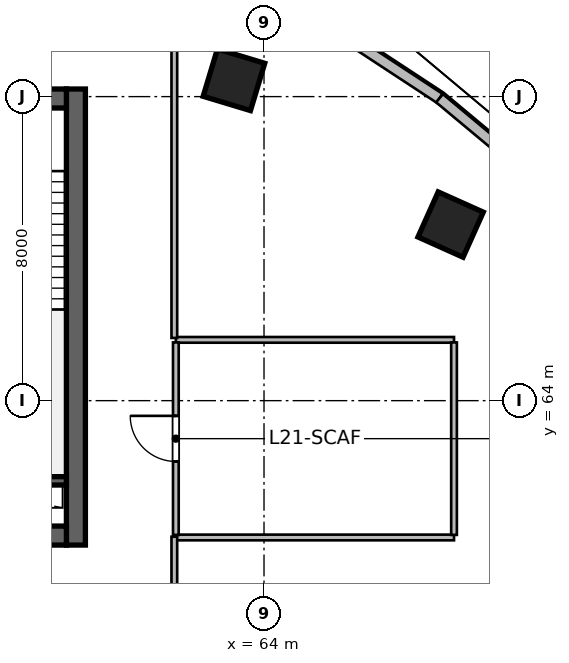
"""IFC4 building model, lengths in metres.
Left out: names, types, materials, properties, quantities, classifications, styles, units other than length and angle.
Written with IfcOpenShell. Run it as: python <this file> out.ifc"""

import sys

from ifc_helpers import new_model, si_unit, direction, frame, frame_2d, origin, origin_2d, place, context, subcontext, project, spatial, rectangle, extrude, source, transform, mapped, element, fill, save


model = new_model("IFC4")
c1 = context("Model", 3, precision=1e-05, world=origin(), true_north=direction((0.0, 1.0)))
c2 = subcontext(c1, "Body", "Model", "MODEL_VIEW")
j1 = project(units=[si_unit("LENGTHUNIT", "METRE"), si_unit("PLANEANGLEUNIT", "RADIAN")], contexts=[c1])
p1 = place(None, origin())
s1 = spatial("IfcSite", under=j1, at=p1, CompositionType="ELEMENT")
p2 = place(p1, origin())
s2 = spatial("IfcBuilding", under=s1, at=p2, CompositionType="ELEMENT")
p3 = place(p2, frame((0.0, 0.0, 91.2)))
s3 = spatial("IfcBuildingStorey", under=s2, at=p3, CompositionType="ELEMENT", Elevation=91.2)
m1 = source(origin(), c2, "Body", "SweptSolid", [
    extrude(rectangle(XDim=12.0, YDim=0.5, at=frame_2d((6.0, 0.0))), origin(), (0.0, 0.0, 1.0), 4.8),
])
p4 = place(p3, frame((59.05, 60.2, 0.0), z_axis=(0.0, 0.0, 1.0), x_axis=(0.0, 1.0, 0.0)))
e1 = element("IfcWall", 1, at=p4, inside=s3, PredefinedType="SHEAR", context=c2, shape_type="MappedRepresentation", body=[
    mapped(m1, transform((0.0, 0.0, 0.0), scale=1.0)),
])
m2 = source(origin(), c2, "Body", "SweptSolid", [
    extrude(rectangle(XDim=21.6, YDim=0.5, at=frame_2d((10.8, 0.0))), origin(), (0.0, 0.0, 1.0), 4.8),
])
p5 = place(p3, frame((37.2, 60.45, 0.0), z_axis=(0.0, 0.0, 1.0), x_axis=(1.0, 0.0, 0.0)))
e2 = element("IfcWall", 2, at=p5, inside=s3, PredefinedType="SHEAR", context=c2, shape_type="MappedRepresentation", body=[
    mapped(m2, transform((0.0, 0.0, 0.0), scale=1.0)),
])
p6 = place(p5, frame((1.1, 0.0, 0.0)))
e3 = element("IfcOpeningElement", 3, at=p6, cuts=e2, PredefinedType="OPENING", context=c2, shape_type="SweptSolid", body=[
    extrude(rectangle(XDim=1.15, YDim=2.15, at=frame_2d((0.575, 1.075))), frame((0.0, 0.26, 0.0), z_axis=(0.0, -1.0, 0.0), x_axis=(1.0, 0.0, 0.0)), (0.0, 0.0, 1.0), 0.52),
])
p7 = place(p5, frame((19.5, 0.0, 0.0)))
e4 = element("IfcOpeningElement", 4, at=p7, cuts=e2, PredefinedType="OPENING", context=c2, shape_type="SweptSolid", body=[
    extrude(rectangle(XDim=0.9, YDim=2.1, at=frame_2d((0.45, 1.05))), frame((0.0, 0.26, 0.0), z_axis=(0.0, -1.0, 0.0), x_axis=(1.0, 0.0, 0.0)), (0.0, 0.0, 1.0), 0.52),
])
p8 = place(p5, frame((12.02, 0.0, 0.0)))
e5 = element("IfcOpeningElement", 5, at=p8, cuts=e2, PredefinedType="OPENING", context=c2, shape_type="SweptSolid", body=[
    extrude(rectangle(XDim=1.6, YDim=2.15, at=frame_2d((0.8, 1.075))), frame((0.0, 0.26, 0.0), z_axis=(0.0, -1.0, 0.0), x_axis=(1.0, 0.0, 0.0)), (0.0, 0.0, 1.0), 0.52),
])
p9 = place(p3, frame((37.2, 71.95, 0.0), z_axis=(0.0, 0.0, 1.0), x_axis=(1.0, 0.0, 0.0)))
e6 = element("IfcWall", 6, at=p9, inside=s3, PredefinedType="SHEAR", context=c2, shape_type="MappedRepresentation", body=[
    mapped(m2, transform((0.0, 0.0, 0.0), scale=1.0)),
])
p10 = place(p9, frame((1.2, 0.0, 0.0)))
e7 = element("IfcOpeningElement", 7, at=p10, cuts=e6, PredefinedType="OPENING", context=c2, shape_type="SweptSolid", body=[
    extrude(rectangle(XDim=0.9, YDim=2.1, at=frame_2d((0.45, 1.05))), frame((0.0, 0.26, 0.0), z_axis=(0.0, -1.0, 0.0), x_axis=(1.0, 0.0, 0.0)), (0.0, 0.0, 1.0), 0.52),
])
p11 = place(p9, frame((14.7, 0.0, 0.0)))
e8 = element("IfcOpeningElement", 8, at=p11, cuts=e6, PredefinedType="OPENING", context=c2, shape_type="SweptSolid", body=[
    extrude(rectangle(XDim=1.2, YDim=2.15, at=frame_2d((0.6, 1.075))), frame((0.0, 0.26, 0.0), z_axis=(0.0, -1.0, 0.0), x_axis=(1.0, 0.0, 0.0)), (0.0, 0.0, 1.0), 0.52),
])
p12 = place(p9, frame((4.15, 0.0, 0.0)))
e9 = element("IfcOpeningElement", 9, at=p12, cuts=e6, PredefinedType="OPENING", context=c2, shape_type="SweptSolid", body=[
    extrude(rectangle(XDim=1.3, YDim=2.15, at=frame_2d((0.65, 1.075))), frame((0.0, 0.26, 0.0), z_axis=(0.0, -1.0, 0.0), x_axis=(1.0, 0.0, 0.0)), (0.0, 0.0, 1.0), 0.52),
])
p13 = place(p9, frame((7.25, 0.0, 0.0)))
e10 = element("IfcOpeningElement", 10, at=p13, cuts=e6, PredefinedType="OPENING", context=c2, shape_type="SweptSolid", body=[
    extrude(rectangle(XDim=0.9, YDim=2.1, at=frame_2d((0.45, 1.05))), frame((0.0, 0.26, 0.0), z_axis=(0.0, -1.0, 0.0), x_axis=(1.0, 0.0, 0.0)), (0.0, 0.0, 1.0), 0.52),
])
m3 = source(origin(), c2, "Body", "SweptSolid", [
    extrude(rectangle(XDim=3.27, YDim=0.22, at=frame_2d((1.635, 0.0))), origin(), (0.0, 0.0, 1.0), 4.8),
])
p14 = place(p3, frame((55.53, 61.89, 0.0), z_axis=(0.0, 0.0, 1.0), x_axis=(1.0, 0.0, 0.0)))
e11 = element("IfcWall", 11, at=p14, inside=s3, PredefinedType="SHEAR", context=c2, shape_type="MappedRepresentation", body=[
    mapped(m3, transform((0.0, 0.0, 0.0), scale=1.0)),
])
m4 = source(origin(), c2, "Body", "SweptSolid", [
    extrude(rectangle(XDim=1.3, YDim=1.3, at=origin_2d()), origin(), (0.0, 0.0, 1.0), 4.8),
])
for number, where, z_axis, x_axis in (
    (12, (63.209, 72.442, 0.0), (0.0, 0.0, 1.0), (0.289, 0.957, 0.0)),
    (13, (68.91, 68.633, 0.0), (0.0, 0.0, 1.0), (0.409, 0.912, 0.0)),
):
    element("IfcColumn", number, at=place(p3, frame(where, z_axis=z_axis, x_axis=x_axis)), inside=s3, PredefinedType="COLUMN", context=c2, shape_type="MappedRepresentation", body=[
        mapped(m4, transform((0.0, 0.0, 0.0), scale=1.0)),
    ])
m5 = source(origin(), c2, "Body", "SweptSolid", [
    extrude(rectangle(XDim=4.626, YDim=0.28, at=frame_2d((2.313, 0.0))), origin(), (0.0, 0.0, 1.0), 4.55),
])
p15 = place(p3, frame((64.751, 74.496, 0.0), z_axis=(0.0, 0.0, 1.0), x_axis=(0.83595938331, -0.548791316855, 0.0)))
e14 = element("IfcWall", 14, at=p15, inside=s3, PredefinedType="SOLIDWALL", context=c2, shape_type="MappedRepresentation", body=[
    mapped(m5, transform((0.0, 0.0, 0.0), scale=1.0)),
])
m6 = source(origin(), c2, "Body", "SweptSolid", [
    extrude(rectangle(XDim=4.762, YDim=0.28, at=frame_2d((2.381, 0.0))), origin(), (0.0, 0.0, 1.0), 4.55),
])
p16 = place(p3, frame((68.618, 71.958, 0.0), z_axis=(0.0, 0.0, 1.0), x_axis=(0.767952279762, -0.640507061638, 0.0)))
e15 = element("IfcWall", 15, at=p16, inside=s3, PredefinedType="SOLIDWALL", context=c2, shape_type="MappedRepresentation", body=[
    mapped(m6, transform((0.0, 0.0, 0.0), scale=1.0)),
])
m7 = source(origin(), c2, "Body", "SweptSolid", [
    extrude(rectangle(XDim=7.32, YDim=0.15, at=frame_2d((3.66, 0.0))), origin(), (0.0, 0.0, 1.0), 4.55),
])
for number, where, z_axis, x_axis in (
    (16, (61.68, 60.4, 0.0), (0.0, 0.0, 1.0), (1.0, 0.0, 0.0)),
    (17, (61.68, 65.6, 0.0), (0.0, 0.0, 1.0), (1.0, 0.0, 0.0)),
):
    element("IfcWall", number, at=place(p3, frame(where, z_axis=z_axis, x_axis=x_axis)), inside=s3, PredefinedType="PARTITIONING", context=c2, shape_type="MappedRepresentation", body=[
        mapped(m7, transform((0.0, 0.0, 0.0), scale=1.0)),
    ])
m8 = source(origin(), c2, "Body", "SweptSolid", [
    extrude(rectangle(XDim=5.065, YDim=0.15, at=frame_2d((2.532, 0.0))), origin(), (0.0, 0.0, 1.0), 4.55),
])
p17 = place(p3, frame((61.68, 60.468, 0.0), z_axis=(0.0, 0.0, 1.0), x_axis=(0.0, 1.0, 0.0)))
e18 = element("IfcWall", 18, at=p17, inside=s3, PredefinedType="PARTITIONING", context=c2, shape_type="MappedRepresentation", body=[
    mapped(m8, transform((0.0, 0.0, 0.0), scale=1.0)),
])
p18 = place(p17, frame((1.933, 0.0, 0.0)))
e19 = element("IfcOpeningElement", 19, at=p18, cuts=e18, PredefinedType="OPENING", context=c2, shape_type="SweptSolid", body=[
    extrude(rectangle(XDim=1.2, YDim=2.15, at=frame_2d((0.6, 1.075))), frame((0.0, 0.085, 0.0), z_axis=(0.0, -1.0, 0.0), x_axis=(1.0, 0.0, 0.0)), (0.0, 0.0, 1.0), 0.17),
])
p19 = place(p3, frame((69.0, 60.468, 0.0), z_axis=(0.0, 0.0, 1.0), x_axis=(0.0, 1.0, 0.0)))
e20 = element("IfcWall", 20, at=p19, inside=s3, PredefinedType="PARTITIONING", context=c2, shape_type="MappedRepresentation", body=[
    mapped(m8, transform((0.0, 0.0, 0.0), scale=1.0)),
])
m9 = source(origin(), c2, "Body", "SweptSolid", [
    extrude(rectangle(XDim=2.46, YDim=0.15, at=frame_2d((1.23, 0.0))), origin(), (0.0, 0.0, 1.0), 4.55),
])
p20 = place(p3, frame((61.64, 57.96, 0.0), z_axis=(0.0, 0.0, 1.0), x_axis=(0.0, 1.0, 0.0)))
e21 = element("IfcWall", 21, at=p20, inside=s3, PredefinedType="PARTITIONING", context=c2, shape_type="MappedRepresentation", body=[
    mapped(m9, transform((0.0, 0.0, 0.0), scale=1.0)),
])
m10 = source(origin(), c2, "Body", "SweptSolid", [
    extrude(rectangle(XDim=10.377, YDim=0.15, at=frame_2d((5.189, 0.0))), origin(), (0.0, 0.0, 1.0), 4.55),
])
p21 = place(p3, frame((61.64, 65.65, 0.0), z_axis=(0.0, 0.0, 1.0), x_axis=(0.0, 1.0, 0.0)))
e22 = element("IfcWall", 22, at=p21, inside=s3, PredefinedType="PARTITIONING", context=c2, shape_type="MappedRepresentation", body=[
    mapped(m10, transform((0.0, 0.0, 0.0), scale=1.0)),
])
m11 = source(origin(), c2, "Body", "SweptSolid", [
    extrude(rectangle(XDim=1.2, YDim=2.15, at=frame_2d((0.6, 1.075))), frame((0.0, 0.025, 0.0), z_axis=(0.0, -1.0, 0.0), x_axis=(1.0, 0.0, 0.0)), (0.0, 0.0, 1.0), 0.05),
])
p22 = place(p18, origin())
e23 = element("IfcDoor", 23, at=p22, inside=s3, OperationType="SINGLE_SWING_RIGHT", PredefinedType="DOOR", context=c2, shape_type="MappedRepresentation", body=[
    mapped(m11, transform((0.0, 0.0, 0.0), scale=1.0)),
])
fill(e19, e23)
save(model, sys.argv[1])
